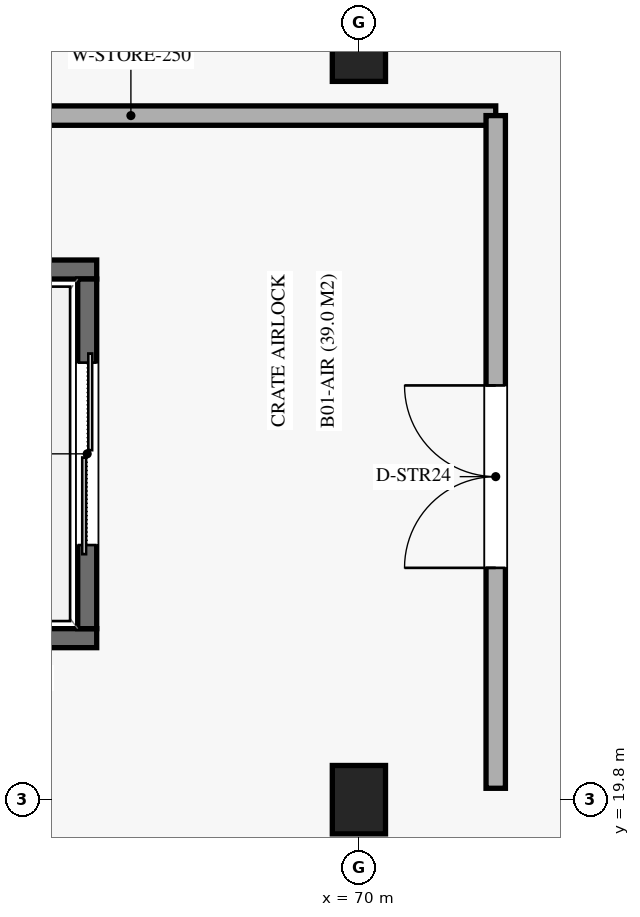
"""IFC4 building model, lengths in metres.
Left out: names, types, materials, properties, quantities, classifications, styles, units other than length and angle.
Written with IfcOpenShell. Run it as: python <this file> out.ifc"""

import sys

from ifc_helpers import new_model, si_unit, direction, frame, frame_2d, origin, origin_2d, place, context, subcontext, project, spatial, rectangle, extrude, element, fill, save


model = new_model("IFC4")
c1 = context("Model", 3, precision=1e-05, world=origin(), true_north=direction((0.0, 1.0)))
c2 = subcontext(c1, "Body", "Model", "MODEL_VIEW")
j1 = project(units=[si_unit("LENGTHUNIT", "METRE"), si_unit("PLANEANGLEUNIT", "RADIAN")], contexts=[c1])
p1 = place(None, origin())
s1 = spatial("IfcSite", under=j1, at=p1, CompositionType="ELEMENT")
p2 = place(p1, origin())
s2 = spatial("IfcBuilding", under=s1, at=p2, CompositionType="ELEMENT")
p3 = place(p2, frame((0.0, 0.0, -4.59)))
s3 = spatial("IfcBuildingStorey", under=s2, at=p3, CompositionType="ELEMENT", Elevation=-4.59)
for number, where, z_axis, x_axis in (
    (1, (70.0, 19.8, 0.0), (0.0, 0.0, 1.0), (1.0, 0.0, 0.0)),
    (2, (70.0, 29.7, 0.0), (0.0, 0.0, 1.0), (1.0, 0.0, 0.0)),
):
    element("IfcColumn", number, at=place(p3, frame(where, z_axis=z_axis, x_axis=x_axis)), inside=s3, PredefinedType="COLUMN", context=c2, shape_type="SweptSolid", body=[
        extrude(rectangle(XDim=0.7, YDim=0.9, at=origin_2d()), origin(), (0.0, 0.0, 1.0), 4.59),
    ])
for number, where, z_axis, x_axis in (
    (3, (62.2, 21.925, 0.0), (0.0, 0.0, 1.0), (1.0, 0.0, 0.0)),
    (4, (62.2, 26.775, 0.0), (0.0, 0.0, 1.0), (1.0, 0.0, 0.0)),
):
    element("IfcWall", number, at=place(p3, frame(where, z_axis=z_axis, x_axis=x_axis)), inside=s3, PredefinedType="SOLIDWALL", context=c2, shape_type="SweptSolid", body=[
        extrude(rectangle(XDim=4.35, YDim=0.25, at=frame_2d((2.175, 0.0))), origin(), (0.0, 0.0, 1.0), 4.27),
    ])
p4 = place(p3, frame((66.425, 22.05, 0.0), z_axis=(0.0, 0.0, 1.0), x_axis=(0.0, 1.0, 0.0)))
e5 = element("IfcWall", 5, at=p4, inside=s3, PredefinedType="SOLIDWALL", context=c2, shape_type="SweptSolid", body=[
    extrude(rectangle(XDim=4.6, YDim=0.25, at=frame_2d((2.3, 0.0))), origin(), (0.0, 0.0, 1.0), 4.27),
])
p5 = place(p4, frame((1.1, 0.0, 0.0)))
e6 = element("IfcOpeningElement", 6, at=p5, cuts=e5, PredefinedType="OPENING", context=c2, shape_type="SweptSolid", body=[
    extrude(rectangle(XDim=2.4, YDim=2.65, at=frame_2d((1.2, 1.325))), frame((0.0, 0.135, 0.0), z_axis=(0.0, -1.0, 0.0), x_axis=(1.0, 0.0, 0.0)), (0.0, 0.0, 1.0), 0.27),
])
p6 = place(p3, frame((62.2, 28.8, 0.0), z_axis=(0.0, 0.0, 1.0), x_axis=(1.0, 0.0, 0.0)))
e7 = element("IfcWall", 7, at=p6, inside=s3, PredefinedType="SOLIDWALL", context=c2, shape_type="SweptSolid", body=[
    extrude(rectangle(XDim=9.6, YDim=0.255, at=frame_2d((4.8, 0.0))), origin(), (0.0, 0.0, 1.0), 3.41),
])
p7 = place(p3, frame((71.8, 19.95, 0.0), z_axis=(0.0, 0.0, 1.0), x_axis=(0.0, 1.0, 0.0)))
e8 = element("IfcWall", 8, at=p7, inside=s3, PredefinedType="SOLIDWALL", context=c2, shape_type="SweptSolid", body=[
    extrude(rectangle(XDim=8.85, YDim=0.255, at=frame_2d((4.425, 0.0))), origin(), (0.0, 0.0, 1.0), 3.41),
])
p8 = place(p7, frame((2.9, 0.0, 0.0)))
e9 = element("IfcOpeningElement", 9, at=p8, cuts=e8, PredefinedType="OPENING", context=c2, shape_type="SweptSolid", body=[
    extrude(rectangle(XDim=2.4, YDim=2.5, at=frame_2d((1.2, 1.25))), frame((0.0, 0.137, 0.0), z_axis=(0.0, -1.0, 0.0), x_axis=(1.0, 0.0, 0.0)), (0.0, 0.0, 1.0), 0.275),
])
p9 = place(p5, origin())
e10 = element("IfcDoor", 10, at=p9, inside=s3, OperationType="DOUBLE_DOOR_SLIDING", PredefinedType="DOOR", context=c2, shape_type="SweptSolid", body=[
    extrude(rectangle(XDim=2.4, YDim=2.65, at=frame_2d((1.2, 1.325))), frame((0.0, 0.025, 0.0), z_axis=(0.0, -1.0, 0.0), x_axis=(1.0, 0.0, 0.0)), (0.0, 0.0, 1.0), 0.05),
])
fill(e6, e10)
p10 = place(p8, origin())
e11 = element("IfcDoor", 11, at=p10, inside=s3, OperationType="DOUBLE_DOOR_SINGLE_SWING", PredefinedType="DOOR", context=c2, shape_type="SweptSolid", body=[
    extrude(rectangle(XDim=2.4, YDim=2.5, at=frame_2d((1.2, 1.25))), frame((0.0, 0.025, 0.0), z_axis=(0.0, -1.0, 0.0), x_axis=(1.0, 0.0, 0.0)), (0.0, 0.0, 1.0), 0.05),
])
fill(e9, e11)
save(model, sys.argv[1])
